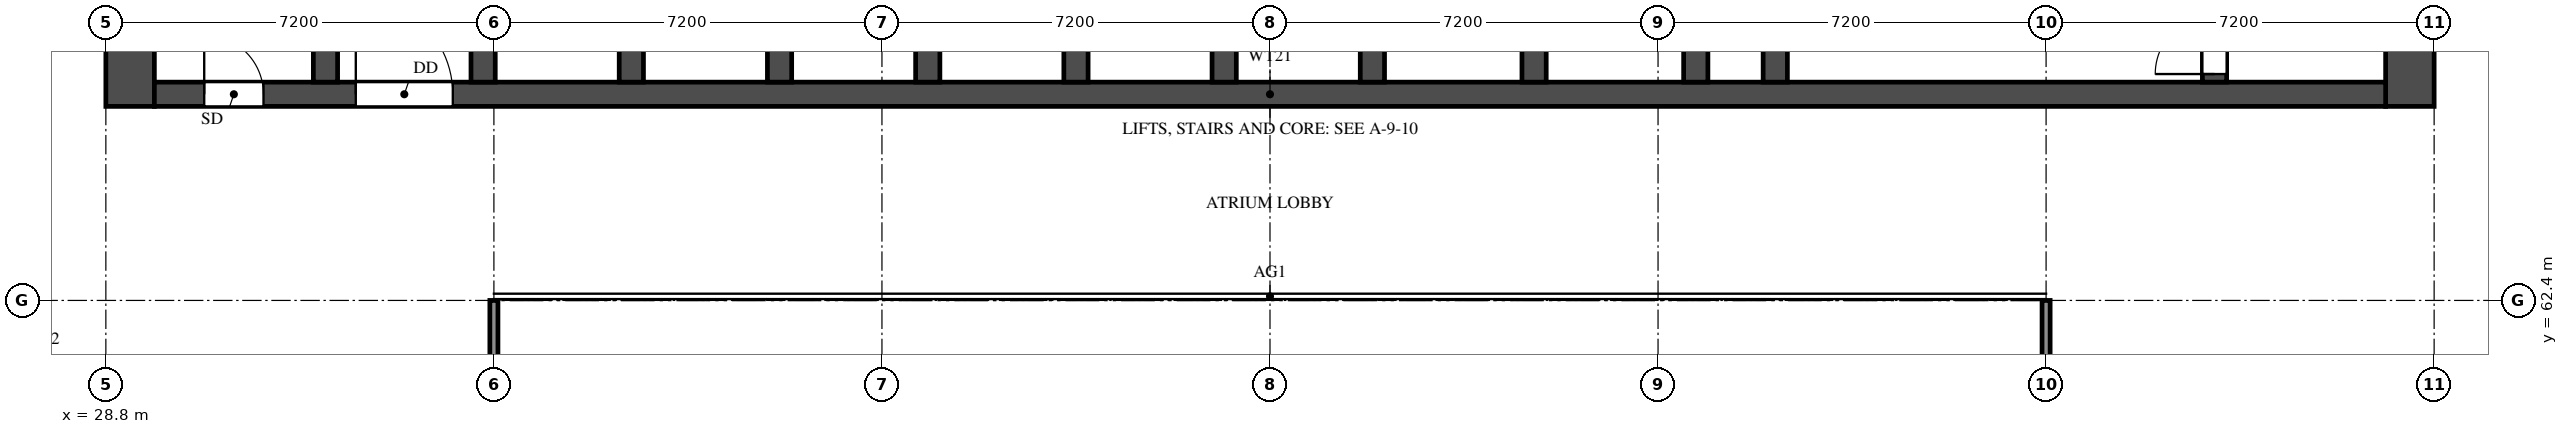
"""IFC4 building model, lengths in metres.
Left out: names, types, materials, properties, quantities, classifications, styles, units other than length and angle.
Written with IfcOpenShell. Run it as: python <this file> out.ifc"""

import sys

from ifc_helpers import new_model, si_unit, direction, frame, frame_2d, origin, place, context, subcontext, project, spatial, rectangle, extrude, element, fill, save


model = new_model("IFC4")
c1 = context("Model", 3, precision=1e-05, world=origin(), true_north=direction((0.0, 1.0)))
c2 = subcontext(c1, "Body", "Model", "MODEL_VIEW")
j1 = project(units=[si_unit("LENGTHUNIT", "METRE"), si_unit("PLANEANGLEUNIT", "RADIAN")], contexts=[c1])
p1 = place(None, origin())
s1 = spatial("IfcSite", under=j1, at=p1, CompositionType="ELEMENT")
p2 = place(p1, origin())
s2 = spatial("IfcBuilding", under=s1, at=p2, CompositionType="ELEMENT")
p3 = place(p2, frame((0.0, 0.0, 55.0)))
s3 = spatial("IfcBuildingStorey", under=s2, at=p3, CompositionType="ELEMENT", Elevation=55.0)
for number, where, z_axis, x_axis in (
    (1, (29.25, 66.0, 0.0), (0.0, 0.0, 1.0), (0.0, 1.0, 0.0)),
    (2, (71.55, 66.0, 0.0), (0.0, 0.0, 1.0), (0.0, 1.0, 0.0)),
):
    element("IfcWall", number, at=place(p3, frame(where, z_axis=z_axis, x_axis=x_axis)), inside=s3, PredefinedType="SHEAR", context=c2, shape_type="SweptSolid", body=[
        extrude(rectangle(XDim=12.0, YDim=0.9, at=frame_2d((6.0, 0.0))), origin(), (0.0, 0.0, 1.0), 3.18),
    ])
p4 = place(p3, frame((29.7, 66.225, 0.0), z_axis=(0.0, 0.0, 1.0), x_axis=(1.0, 0.0, 0.0)))
e3 = element("IfcWall", 3, at=p4, inside=s3, PredefinedType="SHEAR", context=c2, shape_type="SweptSolid", body=[
    extrude(rectangle(XDim=41.4, YDim=0.45, at=frame_2d((20.7, 0.0))), origin(), (0.0, 0.0, 1.0), 3.18),
])
p5 = place(p4, frame((0.925, 0.0, 0.0)))
e4 = element("IfcOpeningElement", 4, at=p5, cuts=e3, PredefinedType="OPENING", context=c2, shape_type="SweptSolid", body=[
    extrude(rectangle(XDim=1.1, YDim=2.1, at=frame_2d((0.55, 1.05))), frame((0.0, 0.235, 0.0), z_axis=(0.0, -1.0, 0.0), x_axis=(1.0, 0.0, 0.0)), (0.0, 0.0, 1.0), 0.47),
])
p6 = place(p4, frame((3.738, 0.0, 0.0)))
e5 = element("IfcOpeningElement", 5, at=p6, cuts=e3, PredefinedType="OPENING", context=c2, shape_type="SweptSolid", body=[
    extrude(rectangle(XDim=1.8, YDim=2.1, at=frame_2d((0.9, 1.05))), frame((0.0, 0.235, 0.0), z_axis=(0.0, -1.0, 0.0), x_axis=(1.0, 0.0, 0.0)), (0.0, 0.0, 1.0), 0.47),
])
p7 = place(p3, frame((32.875, 66.45, 0.0), z_axis=(0.0, 0.0, 1.0), x_axis=(0.0, 1.0, 0.0)))
e6 = element("IfcWall", 6, at=p7, inside=s3, PredefinedType="SHEAR", context=c2, shape_type="SweptSolid", body=[
    extrude(rectangle(XDim=10.65, YDim=0.45, at=frame_2d((5.325, 0.0))), origin(), (0.0, 0.0, 1.0), 3.18),
])
p8 = place(p3, frame((67.925, 66.45, 0.0), z_axis=(0.0, 0.0, 1.0), x_axis=(0.0, 1.0, 0.0)))
e7 = element("IfcWall", 7, at=p8, inside=s3, PredefinedType="SHEAR", context=c2, shape_type="SweptSolid", body=[
    extrude(rectangle(XDim=10.65, YDim=0.45, at=frame_2d((5.325, 0.0))), origin(), (0.0, 0.0, 1.0), 3.18),
])
p9 = place(p8, frame((0.15, 0.0, 0.0)))
e8 = element("IfcOpeningElement", 8, at=p9, cuts=e7, PredefinedType="OPENING", context=c2, shape_type="SweptSolid", body=[
    extrude(rectangle(XDim=1.1, YDim=2.1, at=frame_2d((0.55, 1.05))), frame((0.0, 0.235, 0.0), z_axis=(0.0, -1.0, 0.0), x_axis=(1.0, 0.0, 0.0)), (0.0, 0.0, 1.0), 0.47),
])
p10 = place(p3, frame((59.775, 66.45, 0.0), z_axis=(0.0, 0.0, 1.0), x_axis=(0.0, 1.0, 0.0)))
e9 = element("IfcWall", 9, at=p10, inside=s3, PredefinedType="SHEAR", context=c2, shape_type="SweptSolid", body=[
    extrude(rectangle(XDim=6.025, YDim=0.45, at=frame_2d((3.013, 0.0))), origin(), (0.0, 0.0, 1.0), 3.18),
])
p11 = place(p10, frame((3.85, 0.0, 0.0)))
e10 = element("IfcOpeningElement", 10, at=p11, cuts=e9, PredefinedType="OPENING", context=c2, shape_type="SweptSolid", body=[
    extrude(rectangle(XDim=1.2, YDim=2.1, at=frame_2d((0.6, 1.05))), frame((0.0, 0.235, 0.0), z_axis=(0.0, -1.0, 0.0), x_axis=(1.0, 0.0, 0.0)), (0.0, 0.0, 1.0), 0.47),
])
for number, where, z_axis, x_axis in (
    (11, (35.8, 66.45, 0.0), (0.0, 0.0, 1.0), (0.0, 1.0, 0.0)),
    (12, (38.55, 66.45, 0.0), (0.0, 0.0, 1.0), (0.0, 1.0, 0.0)),
    (13, (41.3, 66.45, 0.0), (0.0, 0.0, 1.0), (0.0, 1.0, 0.0)),
    (14, (44.05, 66.45, 0.0), (0.0, 0.0, 1.0), (0.0, 1.0, 0.0)),
    (15, (46.8, 66.45, 0.0), (0.0, 0.0, 1.0), (0.0, 1.0, 0.0)),
    (16, (49.55, 66.45, 0.0), (0.0, 0.0, 1.0), (0.0, 1.0, 0.0)),
    (17, (52.3, 66.45, 0.0), (0.0, 0.0, 1.0), (0.0, 1.0, 0.0)),
    (18, (55.3, 66.45, 0.0), (0.0, 0.0, 1.0), (0.0, 1.0, 0.0)),
    (19, (58.3, 66.45, 0.0), (0.0, 0.0, 1.0), (0.0, 1.0, 0.0)),
):
    element("IfcWall", number, at=place(p3, frame(where, z_axis=z_axis, x_axis=x_axis)), inside=s3, PredefinedType="SHEAR", context=c2, shape_type="SweptSolid", body=[
        extrude(rectangle(XDim=2.425, YDim=0.45, at=frame_2d((1.212, 0.0))), origin(), (0.0, 0.0, 1.0), 3.18),
    ])
for number, where, z_axis, x_axis in (
    (20, (36.0, 48.0, 0.0), (0.0, 0.0, 1.0), (0.0, 1.0, 0.0)),
    (21, (64.8, 48.0, 0.0), (0.0, 0.0, 1.0), (0.0, 1.0, 0.0)),
):
    element("IfcWall", number, at=place(p3, frame(where, z_axis=z_axis, x_axis=x_axis)), inside=s3, PredefinedType="SOLIDWALL", context=c2, shape_type="SweptSolid", body=[
        extrude(rectangle(XDim=14.4, YDim=0.15, at=frame_2d((7.2, 0.0))), origin(), (0.0, 0.0, 1.0), 2.28),
    ])
p12 = place(p5, origin())
e22 = element("IfcDoor", 22, at=p12, inside=s3, OperationType="SINGLE_SWING_LEFT", PredefinedType="DOOR", context=c2, shape_type="SweptSolid", body=[
    extrude(rectangle(XDim=1.1, YDim=2.1, at=frame_2d((0.55, 1.05))), frame((0.0, 0.025, 0.0), z_axis=(0.0, -1.0, 0.0), x_axis=(1.0, 0.0, 0.0)), (0.0, 0.0, 1.0), 0.05),
])
fill(e4, e22)
p13 = place(p9, origin())
e23 = element("IfcDoor", 23, at=p13, inside=s3, OperationType="SINGLE_SWING_LEFT", PredefinedType="DOOR", context=c2, shape_type="SweptSolid", body=[
    extrude(rectangle(XDim=1.1, YDim=2.1, at=frame_2d((0.55, 1.05))), frame((0.0, 0.025, 0.0), z_axis=(0.0, -1.0, 0.0), x_axis=(1.0, 0.0, 0.0)), (0.0, 0.0, 1.0), 0.05),
])
fill(e8, e23)
p14 = place(p6, origin())
e24 = element("IfcDoor", 24, at=p14, inside=s3, OperationType="DOUBLE_DOOR_SINGLE_SWING", PredefinedType="DOOR", context=c2, shape_type="SweptSolid", body=[
    extrude(rectangle(XDim=1.8, YDim=2.1, at=frame_2d((0.9, 1.05))), frame((0.0, 0.025, 0.0), z_axis=(0.0, -1.0, 0.0), x_axis=(1.0, 0.0, 0.0)), (0.0, 0.0, 1.0), 0.05),
])
fill(e5, e24)
save(model, sys.argv[1])
